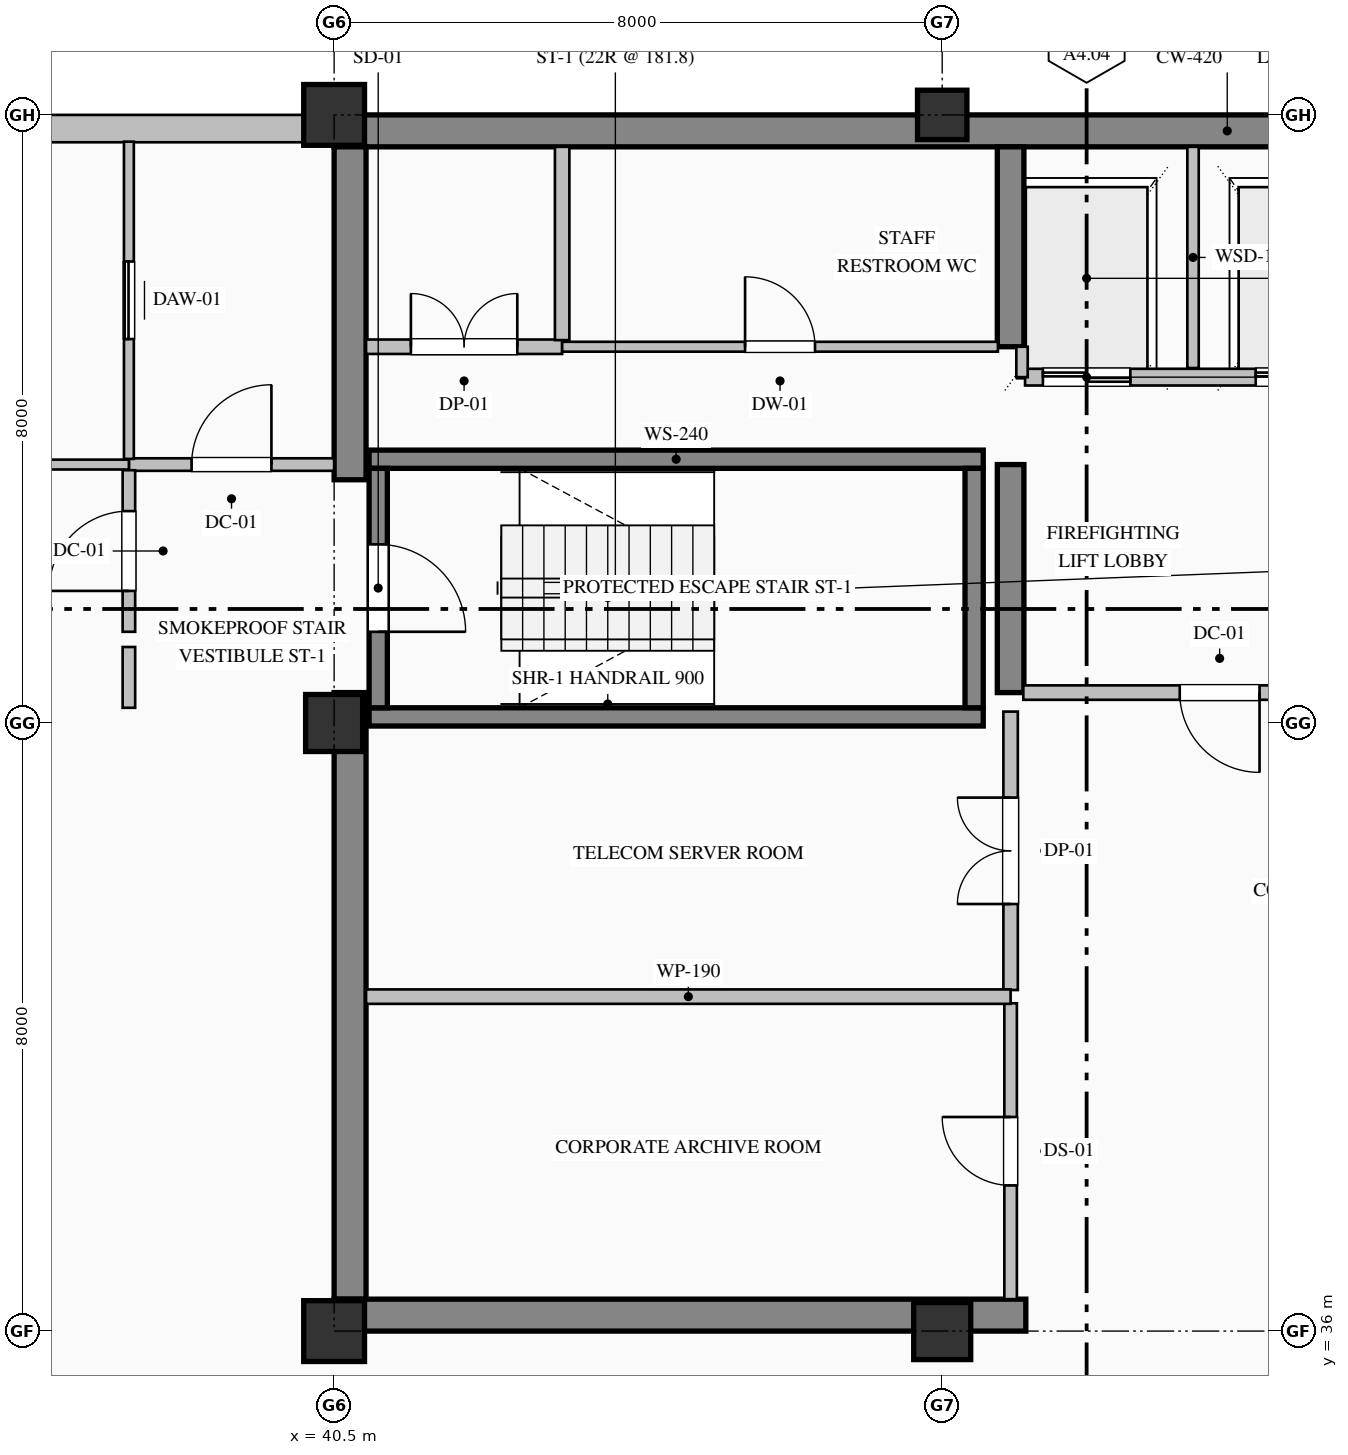
"""IFC4 building model, lengths in metres.
Left out: names, types, materials, properties, quantities, classifications, styles, units other than length and angle.
Written with IfcOpenShell. Run it as: python <this file> out.ifc"""

import sys

from ifc_helpers import new_model, si_unit, direction, frame, frame_2d, origin, origin_2d, place, context, subcontext, project, spatial, rectangle, hollow_rectangle, extrude, element, fill, save


model = new_model("IFC4")
c1 = context("Model", 3, precision=1e-05, world=origin(), true_north=direction((0.0, 1.0)))
c2 = subcontext(c1, "Body", "Model", "MODEL_VIEW")
j1 = project(units=[si_unit("LENGTHUNIT", "METRE"), si_unit("PLANEANGLEUNIT", "RADIAN")], contexts=[c1])
p1 = place(None, origin())
s1 = spatial("IfcSite", under=j1, at=p1, CompositionType="ELEMENT")
p2 = place(p1, origin())
s2 = spatial("IfcBuilding", under=s1, at=p2, CompositionType="ELEMENT")
p3 = place(p2, frame((0.0, 0.0, 311.2)))
s3 = spatial("IfcBuildingStorey", under=s2, at=p3, CompositionType="ELEMENT", Elevation=311.2)
p4 = place(p3, frame((40.5, 51.79, 0.0), z_axis=(0.0, 0.0, 1.0), x_axis=(1.0, 0.0, 0.0)))
e1 = element("IfcWall", 1, at=p4, inside=s3, PredefinedType="SHEAR", context=c2, shape_type="SweptSolid", body=[
    extrude(rectangle(XDim=23.5, YDim=0.42, at=frame_2d((11.75, 0.0))), origin(), (0.0, 0.0, 1.0), 3.785),
])
p5 = place(p3, frame((40.71, 36.42, 0.0), z_axis=(0.0, 0.0, 1.0), x_axis=(0.0, 1.0, 0.0)))
e2 = element("IfcWall", 2, at=p5, inside=s3, PredefinedType="SHEAR", context=c2, shape_type="SweptSolid", body=[
    extrude(rectangle(XDim=7.98, YDim=0.42, at=frame_2d((3.99, 0.0))), origin(), (0.0, 0.0, 1.0), 3.785),
])
p6 = place(p3, frame((40.71, 47.2, 0.0), z_axis=(0.0, 0.0, 1.0), x_axis=(0.0, 1.0, 0.0)))
e3 = element("IfcWall", 3, at=p6, inside=s3, PredefinedType="SHEAR", context=c2, shape_type="SweptSolid", body=[
    extrude(rectangle(XDim=4.38, YDim=0.42, at=frame_2d((2.19, 0.0))), origin(), (0.0, 0.0, 1.0), 3.785),
])
p7 = place(p3, frame((40.5, 36.21, 0.0), z_axis=(0.0, 0.0, 1.0), x_axis=(1.0, 0.0, 0.0)))
e4 = element("IfcWall", 4, at=p7, inside=s3, PredefinedType="SHEAR", context=c2, shape_type="SweptSolid", body=[
    extrude(rectangle(XDim=9.1, YDim=0.42, at=frame_2d((4.55, 0.0))), origin(), (0.0, 0.0, 1.0), 3.785),
])
p8 = place(p3, frame((49.4, 44.4, 0.0), z_axis=(0.0, 0.0, 1.0), x_axis=(0.0, 1.0, 0.0)))
e5 = element("IfcWall", 5, at=p8, inside=s3, PredefinedType="SHEAR", context=c2, shape_type="SweptSolid", body=[
    extrude(rectangle(XDim=3.0, YDim=0.35, at=frame_2d((1.5, 0.0))), origin(), (0.0, 0.0, 1.0), 3.785),
])
p9 = place(p3, frame((49.4, 48.95, 0.0), z_axis=(0.0, 0.0, 1.0), x_axis=(0.0, 1.0, 0.0)))
e6 = element("IfcWall", 6, at=p9, inside=s3, PredefinedType="SHEAR", context=c2, shape_type="SweptSolid", body=[
    extrude(rectangle(XDim=2.63, YDim=0.35, at=frame_2d((1.315, 0.0))), origin(), (0.0, 0.0, 1.0), 3.785),
])
p10 = place(p3, frame((40.5, 36.0, 0.0), z_axis=(0.0, 0.0, 1.0), x_axis=(1.0, 0.0, 0.0)))
e7 = element("IfcColumn", 7, at=p10, inside=s3, PredefinedType="COLUMN", context=c2, shape_type="SweptSolid", body=[
    extrude(hollow_rectangle(XDim=0.8, YDim=0.8, WallThickness=0.032, at=origin_2d()), origin(), (0.0, 0.0, 1.0), 4.0),
])
p11 = place(p3, frame((40.5, 44.0, 0.0), z_axis=(0.0, 0.0, 1.0), x_axis=(1.0, 0.0, 0.0)))
e8 = element("IfcColumn", 8, at=p11, inside=s3, PredefinedType="COLUMN", context=c2, shape_type="SweptSolid", body=[
    extrude(rectangle(XDim=0.75, YDim=0.75, at=origin_2d()), origin(), (0.0, 0.0, 1.0), 4.0),
])
p12 = place(p3, frame((40.5, 52.0, 0.0), z_axis=(0.0, 0.0, 1.0), x_axis=(1.0, 0.0, 0.0)))
e9 = element("IfcColumn", 9, at=p12, inside=s3, PredefinedType="COLUMN", context=c2, shape_type="SweptSolid", body=[
    extrude(hollow_rectangle(XDim=0.8, YDim=0.8, WallThickness=0.032, at=origin_2d()), origin(), (0.0, 0.0, 1.0), 4.0),
])
p13 = place(p3, frame((48.5, 36.0, 0.0), z_axis=(0.0, 0.0, 1.0), x_axis=(1.0, 0.0, 0.0)))
e10 = element("IfcColumn", 10, at=p13, inside=s3, PredefinedType="COLUMN", context=c2, shape_type="SweptSolid", body=[
    extrude(rectangle(XDim=0.75, YDim=0.75, at=origin_2d()), origin(), (0.0, 0.0, 1.0), 4.0),
])
p14 = place(p3, frame((48.5, 52.0, 0.0), z_axis=(0.0, 0.0, 1.0), x_axis=(1.0, 0.0, 0.0)))
e11 = element("IfcColumn", 11, at=p14, inside=s3, PredefinedType="COLUMN", context=c2, shape_type="SweptSolid", body=[
    extrude(hollow_rectangle(XDim=0.65, YDim=0.65, WallThickness=0.028, at=origin_2d()), origin(), (0.0, 0.0, 1.0), 4.0),
])
p15 = place(p3, frame((20.5, 51.82, 0.0), z_axis=(0.0, 0.0, 1.0), x_axis=(1.0, 0.0, 0.0)))
e12 = element("IfcWall", 12, at=p15, inside=s3, PredefinedType="SOLIDWALL", context=c2, shape_type="SweptSolid", body=[
    extrude(rectangle(XDim=20.02, YDim=0.36, at=frame_2d((10.01, 0.0))), origin(), (0.0, 0.0, 1.0), 3.335),
])
p16 = place(p15, frame((6.725, 0.0, 0.9)))
e13 = element("IfcOpeningElement", 13, at=p16, cuts=e12, PredefinedType="OPENING", context=c2, shape_type="SweptSolid", body=[
    extrude(rectangle(XDim=0.95, YDim=1.85, at=frame_2d((0.475, 0.925))), frame((0.0, 0.19, 0.0), z_axis=(0.0, -1.0, 0.0), x_axis=(1.0, 0.0, 0.0)), (0.0, 0.0, 1.0), 0.38),
])
for number, where, z_axis, x_axis in (
    (14, (40.96, 47.47, 0.0), (0.0, 0.0, 1.0), (1.0, 0.0, 0.0)),
    (15, (49.04, 44.08, 0.0), (0.0, 0.0, 1.0), (-1.0, 0.0, 0.0)),
):
    element("IfcWall", number, at=place(p3, frame(where, z_axis=z_axis, x_axis=x_axis)), inside=s3, PredefinedType="SOLIDWALL", context=c2, shape_type="SweptSolid", body=[
        extrude(rectangle(XDim=8.08, YDim=0.24, at=frame_2d((4.04, 0.0))), origin(), (0.0, 0.0, 1.0), 4.0),
    ])
p17 = place(p3, frame((41.08, 47.35, 0.0), z_axis=(0.0, 0.0, 1.0), x_axis=(0.0, -1.0, 0.0)))
e16 = element("IfcWall", 16, at=p17, inside=s3, PredefinedType="SOLIDWALL", context=c2, shape_type="SweptSolid", body=[
    extrude(rectangle(XDim=3.15, YDim=0.24, at=frame_2d((1.575, 0.0))), origin(), (0.0, 0.0, 1.0), 4.0),
])
p18 = place(p17, frame((1.0, 0.0, 0.0)))
e17 = element("IfcOpeningElement", 17, at=p18, cuts=e16, PredefinedType="OPENING", context=c2, shape_type="SweptSolid", body=[
    extrude(rectangle(XDim=1.15, YDim=2.2, at=frame_2d((0.575, 1.1))), frame((0.0, 0.13, 0.0), z_axis=(0.0, -1.0, 0.0), x_axis=(1.0, 0.0, 0.0)), (0.0, 0.0, 1.0), 0.26),
])
p19 = place(p3, frame((48.92, 44.2, 0.0), z_axis=(0.0, 0.0, 1.0), x_axis=(0.0, 1.0, 0.0)))
e18 = element("IfcWall", 18, at=p19, inside=s3, PredefinedType="SOLIDWALL", context=c2, shape_type="SweptSolid", body=[
    extrude(rectangle(XDim=3.15, YDim=0.24, at=frame_2d((1.575, 0.0))), origin(), (0.0, 0.0, 1.0), 4.0),
])
p20 = place(p3, frame((54.71, 48.55, 0.0), z_axis=(0.0, 0.0, 1.0), x_axis=(-1.0, 0.0, 0.0)))
e19 = element("IfcWall", 19, at=p20, inside=s3, PredefinedType="PARTITIONING", context=c2, shape_type="SweptSolid", body=[
    extrude(rectangle(XDim=5.12, YDim=0.22, at=frame_2d((2.56, 0.0))), origin(), (0.0, 0.0, 1.0), 3.785),
])
p21 = place(p20, frame((3.735, 0.0, 0.0)))
e20 = element("IfcOpeningElement", 20, at=p21, cuts=e19, PredefinedType="OPENING", context=c2, shape_type="SweptSolid", body=[
    extrude(rectangle(XDim=1.15, YDim=2.2, at=frame_2d((0.575, 1.1))), frame((0.0, 0.12, 0.0), z_axis=(0.0, -1.0, 0.0), x_axis=(1.0, 0.0, 0.0)), (0.0, 0.0, 1.0), 0.24),
])
p22 = place(p20, frame((0.935, 0.0, 0.0)))
e21 = element("IfcOpeningElement", 21, at=p22, cuts=e19, PredefinedType="OPENING", context=c2, shape_type="SweptSolid", body=[
    extrude(rectangle(XDim=1.15, YDim=2.2, at=frame_2d((0.575, 1.1))), frame((0.0, 0.12, 0.0), z_axis=(0.0, -1.0, 0.0), x_axis=(1.0, 0.0, 0.0)), (0.0, 0.0, 1.0), 0.24),
])
p23 = place(p3, frame((51.8, 48.67, 0.0), z_axis=(0.0, 0.0, 1.0), x_axis=(0.0, 1.0, 0.0)))
e22 = element("IfcWall", 22, at=p23, inside=s3, PredefinedType="PARTITIONING", context=c2, shape_type="SweptSolid", body=[
    extrude(rectangle(XDim=2.91, YDim=0.15, at=frame_2d((1.455, 0.0))), origin(), (0.0, 0.0, 1.0), 3.785),
])
p24 = place(p3, frame((49.55, 48.55, 0.0), z_axis=(0.0, 0.0, 1.0), x_axis=(0.0, 1.0, 0.0)))
e23 = element("IfcWall", 23, at=p24, inside=s3, PredefinedType="PARTITIONING", context=c2, shape_type="SweptSolid", body=[
    extrude(rectangle(XDim=0.4, YDim=0.15, at=frame_2d((0.2, 0.0))), origin(), (0.0, 0.0, 1.0), 3.785),
])
p25 = place(p3, frame((37.8, 47.4, 0.0), z_axis=(0.0, 0.0, 1.0), x_axis=(1.0, 0.0, 0.0)))
e24 = element("IfcWall", 24, at=p25, inside=s3, PredefinedType="PARTITIONING", context=c2, shape_type="SweptSolid", body=[
    extrude(rectangle(XDim=2.7, YDim=0.165, at=frame_2d((1.35, 0.0))), origin(), (0.0, 0.0, 1.0), 3.785),
])
p26 = place(p25, frame((0.825, 0.0, 0.0)))
e25 = element("IfcOpeningElement", 25, at=p26, cuts=e24, PredefinedType="OPENING", context=c2, shape_type="SweptSolid", body=[
    extrude(rectangle(XDim=1.05, YDim=2.15, at=frame_2d((0.525, 1.075))), frame((0.0, 0.093, 0.0), z_axis=(0.0, -1.0, 0.0), x_axis=(1.0, 0.0, 0.0)), (0.0, 0.0, 1.0), 0.185),
])
p27 = place(p3, frame((37.8, 45.2, 0.0), z_axis=(0.0, 0.0, 1.0), x_axis=(0.0, 1.0, 0.0)))
e26 = element("IfcWall", 26, at=p27, inside=s3, PredefinedType="PARTITIONING", context=c2, shape_type="SweptSolid", body=[
    extrude(rectangle(XDim=2.125, YDim=0.165, at=frame_2d((1.063, 0.0))), origin(), (0.0, 0.0, 1.0), 3.785),
])
p28 = place(p27, frame((0.538, 0.0, 0.0)))
e27 = element("IfcOpeningElement", 27, at=p28, cuts=e26, PredefinedType="OPENING", context=c2, shape_type="SweptSolid", body=[
    extrude(rectangle(XDim=1.05, YDim=2.15, at=frame_2d((0.525, 1.075))), frame((0.0, 0.093, 0.0), z_axis=(0.0, -1.0, 0.0), x_axis=(1.0, 0.0, 0.0)), (0.0, 0.0, 1.0), 0.185),
])
p29 = place(p3, frame((37.8, 44.2, 0.0), z_axis=(0.0, 0.0, 1.0), x_axis=(0.0, 1.0, 0.0)))
e28 = element("IfcWall", 28, at=p29, inside=s3, PredefinedType="PARTITIONING", context=c2, shape_type="SweptSolid", body=[
    extrude(rectangle(XDim=0.8, YDim=0.165, at=frame_2d((0.4, 0.0))), origin(), (0.0, 0.0, 1.0), 3.785),
])
p30 = place(p3, frame((37.8, 47.475, 0.0), z_axis=(0.0, 0.0, 1.0), x_axis=(0.0, 1.0, 0.0)))
e29 = element("IfcWall", 29, at=p30, inside=s3, PredefinedType="PARTITIONING", context=c2, shape_type="SweptSolid", body=[
    extrude(rectangle(XDim=4.173, YDim=0.13, at=frame_2d((2.087, 0.0))), origin(), (0.0, 0.0, 1.0), 3.785),
])
p31 = place(p30, frame((1.577, 0.0, 0.0)))
e30 = element("IfcOpeningElement", 30, at=p31, cuts=e29, PredefinedType="OPENING", context=c2, shape_type="SweptSolid", body=[
    extrude(rectangle(XDim=1.02, YDim=2.15, at=frame_2d((0.51, 1.075))), frame((0.0, 0.075, 0.0), z_axis=(0.0, -1.0, 0.0), x_axis=(1.0, 0.0, 0.0)), (0.0, 0.0, 1.0), 0.15),
])
p32 = place(p3, frame((37.8, 47.4, 0.0), z_axis=(0.0, 0.0, 1.0), x_axis=(-1.0, 0.0, 0.0)))
e31 = element("IfcWall", 31, at=p32, inside=s3, PredefinedType="PARTITIONING", context=c2, shape_type="SweptSolid", body=[
    extrude(rectangle(XDim=2.4, YDim=0.13, at=frame_2d((1.2, 0.0))), origin(), (0.0, 0.0, 1.0), 3.785),
])
p33 = place(p3, frame((40.92, 48.95, 0.0), z_axis=(0.0, 0.0, 1.0), x_axis=(1.0, 0.0, 0.0)))
e32 = element("IfcWall", 32, at=p33, inside=s3, PredefinedType="PARTITIONING", context=c2, shape_type="SweptSolid", body=[
    extrude(rectangle(XDim=2.58, YDim=0.19, at=frame_2d((1.29, 0.0))), origin(), (0.0, 0.0, 1.0), 3.785),
])
p34 = place(p33, frame((0.59, 0.0, 0.0)))
e33 = element("IfcOpeningElement", 33, at=p34, cuts=e32, PredefinedType="OPENING", context=c2, shape_type="SweptSolid", body=[
    extrude(rectangle(XDim=1.4, YDim=2.25, at=frame_2d((0.7, 1.125))), frame((0.0, 0.105, 0.0), z_axis=(0.0, -1.0, 0.0), x_axis=(1.0, 0.0, 0.0)), (0.0, 0.0, 1.0), 0.21),
])
p35 = place(p3, frame((43.5, 48.95, 0.0), z_axis=(0.0, 0.0, 1.0), x_axis=(1.0, 0.0, 0.0)))
e34 = element("IfcWall", 34, at=p35, inside=s3, PredefinedType="PARTITIONING", context=c2, shape_type="SweptSolid", body=[
    extrude(rectangle(XDim=5.733, YDim=0.13, at=frame_2d((2.866, 0.0))), origin(), (0.0, 0.0, 1.0), 3.785),
])
p36 = place(p35, frame((2.406, 0.0, 0.0)))
e35 = element("IfcOpeningElement", 35, at=p36, cuts=e34, PredefinedType="OPENING", context=c2, shape_type="SweptSolid", body=[
    extrude(rectangle(XDim=0.92, YDim=2.15, at=frame_2d((0.46, 1.075))), frame((0.0, 0.075, 0.0), z_axis=(0.0, -1.0, 0.0), x_axis=(1.0, 0.0, 0.0)), (0.0, 0.0, 1.0), 0.15),
])
p37 = place(p3, frame((54.733, 44.4, 0.0), z_axis=(0.0, 0.0, 1.0), x_axis=(-1.0, 0.0, 0.0)))
e36 = element("IfcWall", 36, at=p37, inside=s3, PredefinedType="PARTITIONING", context=c2, shape_type="SweptSolid", body=[
    extrude(rectangle(XDim=5.166, YDim=0.19, at=frame_2d((2.583, 0.0))), origin(), (0.0, 0.0, 1.0), 3.785),
])
p38 = place(p37, frame((2.058, 0.0, 0.0)))
e37 = element("IfcOpeningElement", 37, at=p38, cuts=e36, PredefinedType="OPENING", context=c2, shape_type="SweptSolid", body=[
    extrude(rectangle(XDim=1.05, YDim=2.15, at=frame_2d((0.525, 1.075))), frame((0.0, 0.105, 0.0), z_axis=(0.0, -1.0, 0.0), x_axis=(1.0, 0.0, 0.0)), (0.0, 0.0, 1.0), 0.21),
])
p39 = place(p3, frame((49.4, 36.42, 0.0), z_axis=(0.0, 0.0, 1.0), x_axis=(0.0, 1.0, 0.0)))
e38 = element("IfcWall", 38, at=p39, inside=s3, PredefinedType="PARTITIONING", context=c2, shape_type="SweptSolid", body=[
    extrude(rectangle(XDim=3.893, YDim=0.165, at=frame_2d((1.947, 0.0))), origin(), (0.0, 0.0, 1.0), 3.027),
])
p40 = place(p39, frame((1.497, 0.0, 0.0)))
e39 = element("IfcOpeningElement", 39, at=p40, cuts=e38, PredefinedType="OPENING", context=c2, shape_type="SweptSolid", body=[
    extrude(rectangle(XDim=0.9, YDim=2.15, at=frame_2d((0.45, 1.075))), frame((0.0, 0.093, 0.0), z_axis=(0.0, -1.0, 0.0), x_axis=(1.0, 0.0, 0.0)), (0.0, 0.0, 1.0), 0.185),
])
p41 = place(p3, frame((49.4, 40.487, 0.0), z_axis=(0.0, 0.0, 1.0), x_axis=(0.0, 1.0, 0.0)))
e40 = element("IfcWall", 40, at=p41, inside=s3, PredefinedType="PARTITIONING", context=c2, shape_type="SweptSolid", body=[
    extrude(rectangle(XDim=3.663, YDim=0.19, at=frame_2d((1.832, 0.0))), origin(), (0.0, 0.0, 1.0), 3.027),
])
p42 = place(p41, frame((1.132, 0.0, 0.0)))
e41 = element("IfcOpeningElement", 41, at=p42, cuts=e40, PredefinedType="OPENING", context=c2, shape_type="SweptSolid", body=[
    extrude(rectangle(XDim=1.4, YDim=2.25, at=frame_2d((0.7, 1.125))), frame((0.0, 0.105, 0.0), z_axis=(0.0, -1.0, 0.0), x_axis=(1.0, 0.0, 0.0)), (0.0, 0.0, 1.0), 0.21),
])
p43 = place(p3, frame((40.92, 40.4, 0.0), z_axis=(0.0, 0.0, 1.0), x_axis=(1.0, 0.0, 0.0)))
e42 = element("IfcWall", 42, at=p43, inside=s3, PredefinedType="PARTITIONING", context=c2, shape_type="SweptSolid", body=[
    extrude(rectangle(XDim=8.48, YDim=0.19, at=frame_2d((4.24, 0.0))), origin(), (0.0, 0.0, 1.0), 3.785),
])
p44 = place(p3, frame((43.5, 51.58, 0.0), z_axis=(0.0, 0.0, 1.0), x_axis=(0.0, -1.0, 0.0)))
e43 = element("IfcWall", 43, at=p44, inside=s3, PredefinedType="PARTITIONING", context=c2, shape_type="SweptSolid", body=[
    extrude(rectangle(XDim=2.543, YDim=0.19, at=frame_2d((1.271, 0.0))), origin(), (0.0, 0.0, 1.0), 3.785),
])
p45 = place(p18, origin())
e44 = element("IfcDoor", 44, at=p45, inside=s3, OperationType="SINGLE_SWING_RIGHT", PredefinedType="DOOR", context=c2, shape_type="SweptSolid", body=[
    extrude(rectangle(XDim=1.15, YDim=2.2, at=frame_2d((0.575, 1.1))), frame((0.0, 0.025, 0.0), z_axis=(0.0, -1.0, 0.0), x_axis=(1.0, 0.0, 0.0)), (0.0, 0.0, 1.0), 0.05),
])
fill(e17, e44)
p46 = place(p21, origin())
e45 = element("IfcDoor", 45, at=p46, inside=s3, OperationType="DOUBLE_DOOR_SLIDING", PredefinedType="DOOR", context=c2, shape_type="SweptSolid", body=[
    extrude(rectangle(XDim=1.15, YDim=2.2, at=frame_2d((0.575, 1.1))), frame((0.0, 0.025, 0.0), z_axis=(0.0, -1.0, 0.0), x_axis=(1.0, 0.0, 0.0)), (0.0, 0.0, 1.0), 0.05),
])
fill(e20, e45)
p47 = place(p22, origin())
e46 = element("IfcDoor", 46, at=p47, inside=s3, OperationType="DOUBLE_DOOR_SLIDING", PredefinedType="DOOR", context=c2, shape_type="SweptSolid", body=[
    extrude(rectangle(XDim=1.15, YDim=2.2, at=frame_2d((0.575, 1.1))), frame((0.0, 0.025, 0.0), z_axis=(0.0, -1.0, 0.0), x_axis=(1.0, 0.0, 0.0)), (0.0, 0.0, 1.0), 0.05),
])
fill(e21, e46)
p48 = place(p38, origin())
e47 = element("IfcDoor", 47, at=p48, inside=s3, OperationType="SINGLE_SWING_LEFT", PredefinedType="DOOR", context=c2, shape_type="SweptSolid", body=[
    extrude(rectangle(XDim=1.05, YDim=2.15, at=frame_2d((0.525, 1.075))), frame((0.0, 0.025, 0.0), z_axis=(0.0, -1.0, 0.0), x_axis=(1.0, 0.0, 0.0)), (0.0, 0.0, 1.0), 0.05),
])
fill(e37, e47)
p49 = place(p26, origin())
e48 = element("IfcDoor", 48, at=p49, inside=s3, OperationType="SINGLE_SWING_RIGHT", PredefinedType="DOOR", context=c2, shape_type="SweptSolid", body=[
    extrude(rectangle(XDim=1.05, YDim=2.15, at=frame_2d((0.525, 1.075))), frame((0.0, 0.025, 0.0), z_axis=(0.0, -1.0, 0.0), x_axis=(1.0, 0.0, 0.0)), (0.0, 0.0, 1.0), 0.05),
])
fill(e25, e48)
p50 = place(p28, origin())
e49 = element("IfcDoor", 49, at=p50, inside=s3, OperationType="SINGLE_SWING_LEFT", PredefinedType="DOOR", context=c2, shape_type="SweptSolid", body=[
    extrude(rectangle(XDim=1.05, YDim=2.15, at=frame_2d((0.525, 1.075))), frame((0.0, 0.025, 0.0), z_axis=(0.0, -1.0, 0.0), x_axis=(1.0, 0.0, 0.0)), (0.0, 0.0, 1.0), 0.05),
])
fill(e27, e49)
p51 = place(p31, origin())
e50 = element("IfcDoor", 50, at=p51, inside=s3, OperationType="SLIDING_TO_LEFT", PredefinedType="DOOR", context=c2, shape_type="SweptSolid", body=[
    extrude(rectangle(XDim=1.02, YDim=2.15, at=frame_2d((0.51, 1.075))), frame((0.0, 0.025, 0.0), z_axis=(0.0, -1.0, 0.0), x_axis=(1.0, 0.0, 0.0)), (0.0, 0.0, 1.0), 0.05),
])
fill(e30, e50)
p52 = place(p40, origin())
e51 = element("IfcDoor", 51, at=p52, inside=s3, OperationType="SINGLE_SWING_RIGHT", PredefinedType="DOOR", context=c2, shape_type="SweptSolid", body=[
    extrude(rectangle(XDim=0.9, YDim=2.15, at=frame_2d((0.45, 1.075))), frame((0.0, 0.025, 0.0), z_axis=(0.0, -1.0, 0.0), x_axis=(1.0, 0.0, 0.0)), (0.0, 0.0, 1.0), 0.05),
])
fill(e39, e51)
p53 = place(p42, origin())
e52 = element("IfcDoor", 52, at=p53, inside=s3, OperationType="DOUBLE_DOOR_SINGLE_SWING", PredefinedType="DOOR", context=c2, shape_type="SweptSolid", body=[
    extrude(rectangle(XDim=1.4, YDim=2.25, at=frame_2d((0.7, 1.125))), frame((0.0, 0.025, 0.0), z_axis=(0.0, -1.0, 0.0), x_axis=(1.0, 0.0, 0.0)), (0.0, 0.0, 1.0), 0.05),
])
fill(e41, e52)
p54 = place(p34, origin())
e53 = element("IfcDoor", 53, at=p54, inside=s3, OperationType="DOUBLE_DOOR_SINGLE_SWING", PredefinedType="DOOR", context=c2, shape_type="SweptSolid", body=[
    extrude(rectangle(XDim=1.4, YDim=2.25, at=frame_2d((0.7, 1.125))), frame((0.0, 0.025, 0.0), z_axis=(0.0, -1.0, 0.0), x_axis=(1.0, 0.0, 0.0)), (0.0, 0.0, 1.0), 0.05),
])
fill(e33, e53)
p55 = place(p36, origin())
e54 = element("IfcDoor", 54, at=p55, inside=s3, OperationType="SINGLE_SWING_LEFT", PredefinedType="DOOR", context=c2, shape_type="SweptSolid", body=[
    extrude(rectangle(XDim=0.92, YDim=2.15, at=frame_2d((0.46, 1.075))), frame((0.0, 0.025, 0.0), z_axis=(0.0, -1.0, 0.0), x_axis=(1.0, 0.0, 0.0)), (0.0, 0.0, 1.0), 0.05),
])
fill(e35, e54)
save(model, sys.argv[1])
